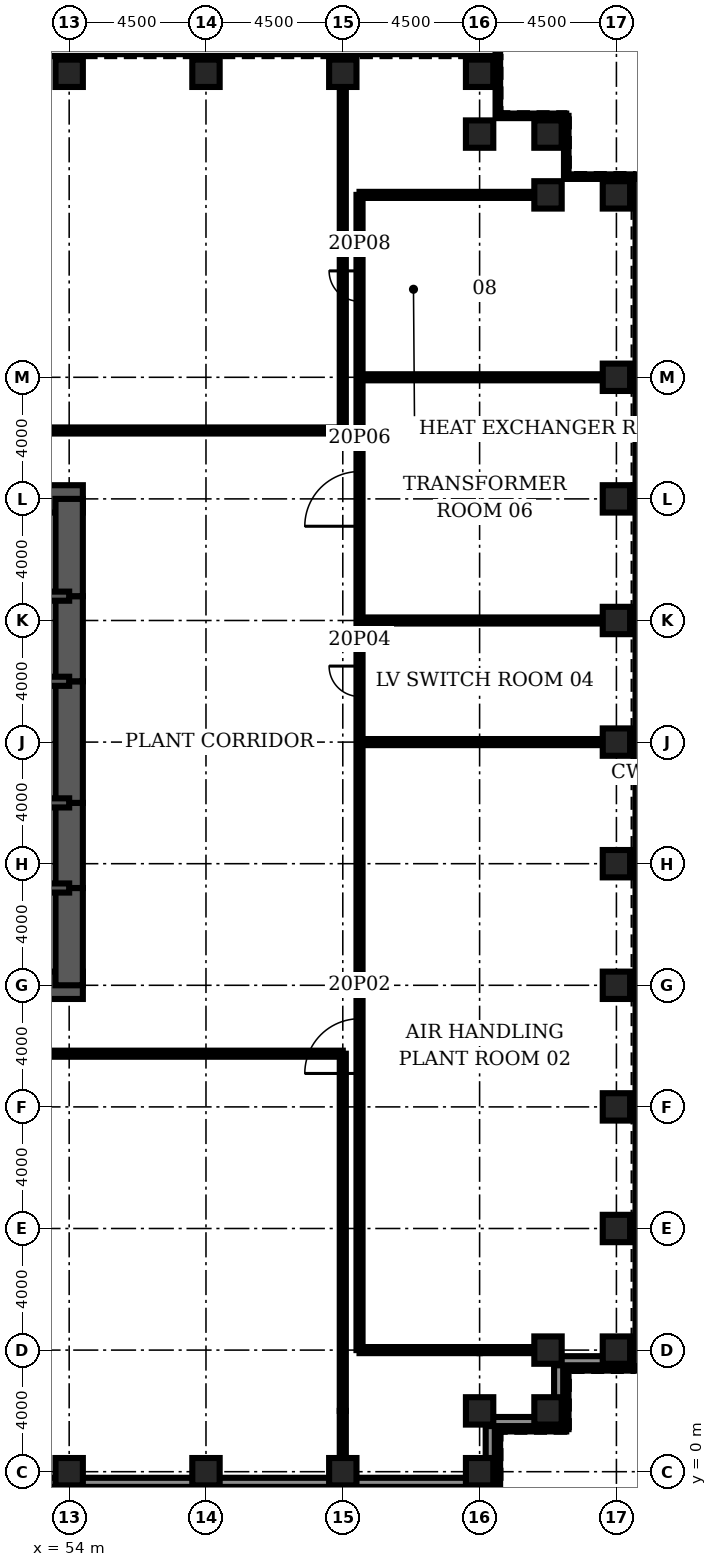
"""IFC4 building model, lengths in metres.
Left out: names, types, materials, properties, quantities, classifications, styles, units other than length and angle.
Written with IfcOpenShell. Run it as: python <this file> out.ifc"""

import sys

from ifc_helpers import new_model, si_unit, direction, frame, frame_2d, origin, origin_2d, place, context, subcontext, project, spatial, rectangle, hollow_rectangle, extrude, element, fill, save


model = new_model("IFC4")
c1 = context("Model", 3, precision=1e-05, world=origin(), true_north=direction((0.0, 1.0)))
c2 = subcontext(c1, "Body", "Model", "MODEL_VIEW")
j1 = project(units=[si_unit("LENGTHUNIT", "METRE"), si_unit("PLANEANGLEUNIT", "RADIAN")], contexts=[c1])
p1 = place(None, origin())
s1 = spatial("IfcSite", under=j1, at=p1, CompositionType="ELEMENT")
p2 = place(p1, origin())
s2 = spatial("IfcBuilding", under=s1, at=p2, CompositionType="ELEMENT")
p3 = place(p2, frame((0.0, 0.0, 95.0)))
s3 = spatial("IfcBuildingStorey", under=s2, at=p3, CompositionType="ELEMENT", Elevation=95.0)
for number, where, z_axis, x_axis in (
    (1, (54.0, 0.056, 0.155), (0.0, 0.342, 0.94), (0.0, -0.94, 0.342)),
    (2, (58.5, 0.056, 0.155), (0.0, 0.342, 0.94), (0.0, -0.94, 0.342)),
    (3, (63.0, 0.056, 0.155), (0.0, 0.342, 0.94), (0.0, -0.94, 0.342)),
    (4, (67.5, 0.056, 0.155), (0.0, 0.342, 0.94), (0.0, -0.94, 0.342)),
    (5, (67.5, 2.056, 0.155), (0.0, 0.342, 0.94), (0.0, -0.94, 0.342)),
    (6, (69.75, 2.056, 0.155), (0.0, 0.342, 0.94), (-1.0, 0.0, 0.0)),
    (7, (69.75, 4.056, 0.155), (0.0, 0.342, 0.94), (-1.0, 0.0, 0.0)),
    (8, (72.0, 4.056, 0.155), (0.0, 0.342, 0.94), (-1.0, 0.0, 0.0)),
):
    element("IfcColumn", number, at=place(p3, frame(where, z_axis=z_axis, x_axis=x_axis)), inside=s3, PredefinedType="USERDEFINED", context=c2, shape_type="SweptSolid", body=[
        extrude(hollow_rectangle(XDim=0.9, YDim=0.9, WallThickness=0.11, at=origin_2d()), origin(), (0.0, 0.0, 1.0), 5.522),
    ])
for number, where, z_axis, x_axis in (
    (9, (72.0, 8.0, 0.0), (0.0, 0.0, 1.0), (1.0, 0.0, 0.0)),
    (10, (72.0, 12.0, 0.0), (0.0, 0.0, 1.0), (1.0, 0.0, 0.0)),
    (11, (72.0, 16.0, 0.0), (0.0, 0.0, 1.0), (1.0, 0.0, 0.0)),
    (12, (72.0, 20.0, 0.0), (0.0, 0.0, 1.0), (1.0, 0.0, 0.0)),
    (13, (72.0, 24.0, 0.0), (0.0, 0.0, 1.0), (1.0, 0.0, 0.0)),
    (14, (72.0, 28.0, 0.0), (0.0, 0.0, 1.0), (1.0, 0.0, 0.0)),
    (15, (72.0, 32.0, 0.0), (0.0, 0.0, 1.0), (1.0, 0.0, 0.0)),
    (16, (72.0, 36.0, 0.0), (0.0, 0.0, 1.0), (1.0, 0.0, 0.0)),
    (17, (72.0, 42.0, 0.0), (0.0, 0.0, 1.0), (1.0, 0.0, 0.0)),
    (18, (69.75, 42.0, 0.0), (0.0, 0.0, 1.0), (1.0, 0.0, 0.0)),
    (19, (69.75, 44.0, 0.0), (0.0, 0.0, 1.0), (1.0, 0.0, 0.0)),
    (20, (67.5, 44.0, 0.0), (0.0, 0.0, 1.0), (0.0, 1.0, 0.0)),
    (21, (67.5, 46.0, 0.0), (0.0, 0.0, 1.0), (0.0, 1.0, 0.0)),
    (22, (63.0, 46.0, 0.0), (0.0, 0.0, 1.0), (0.0, 1.0, 0.0)),
    (23, (58.5, 46.0, 0.0), (0.0, 0.0, 1.0), (0.0, 1.0, 0.0)),
    (24, (54.0, 46.0, 0.0), (0.0, 0.0, 1.0), (0.0, 1.0, 0.0)),
):
    element("IfcColumn", number, at=place(p3, frame(where, z_axis=z_axis, x_axis=x_axis)), inside=s3, PredefinedType="COLUMN", context=c2, shape_type="SweptSolid", body=[
        extrude(hollow_rectangle(XDim=0.9, YDim=0.9, WallThickness=0.11, at=origin_2d()), origin(), (0.0, 0.0, 1.0), 5.5),
    ])
for number, where, z_axis, x_axis in (
    (25, (45.0, 16.0, 0.0), (0.0, 0.0, 1.0), (1.0, 0.0, 0.0)),
    (26, (54.45, 32.0, 0.0), (0.0, 0.0, 1.0), (-1.0, 0.0, 0.0)),
):
    element("IfcWall", number, at=place(p3, frame(where, z_axis=z_axis, x_axis=x_axis)), inside=s3, PredefinedType="SHEAR", context=c2, shape_type="SweptSolid", body=[
        extrude(rectangle(XDim=9.45, YDim=0.9, at=frame_2d((4.725, 0.0))), origin(), (0.0, 0.0, 1.0), 5.5),
    ])
p4 = place(p3, frame((54.0, 16.0, 0.0), z_axis=(0.0, 0.0, 1.0), x_axis=(0.0, 1.0, 0.0)))
e27 = element("IfcWall", 27, at=p4, inside=s3, PredefinedType="SHEAR", context=c2, shape_type="SweptSolid", body=[
    extrude(rectangle(XDim=3.2, YDim=0.9, at=frame_2d((1.6, 0.0))), origin(), (0.0, 0.0, 1.0), 5.5),
])
p5 = place(p3, frame((54.0, 19.2, 0.0), z_axis=(0.0, 0.0, 1.0), x_axis=(0.0, 1.0, 0.0)))
e28 = element("IfcWall", 28, at=p5, inside=s3, PredefinedType="SHEAR", context=c2, shape_type="SweptSolid", body=[
    extrude(rectangle(XDim=2.8, YDim=0.9, at=frame_2d((1.4, 0.0))), origin(), (0.0, 0.0, 1.0), 5.5),
])
p6 = place(p5, frame((0.4, 0.0, 0.0)))
e29 = element("IfcOpeningElement", 29, at=p6, cuts=e28, PredefinedType="OPENING", context=c2, shape_type="SweptSolid", body=[
    extrude(rectangle(XDim=1.8, YDim=2.1, at=frame_2d((0.9, 1.05))), frame((0.0, 0.46, 0.0), z_axis=(0.0, -1.0, 0.0), x_axis=(1.0, 0.0, 0.0)), (0.0, 0.0, 1.0), 0.92),
])
p7 = place(p3, frame((54.0, 22.0, 0.0), z_axis=(0.0, 0.0, 1.0), x_axis=(0.0, 1.0, 0.0)))
e30 = element("IfcWall", 30, at=p7, inside=s3, PredefinedType="SHEAR", context=c2, shape_type="SweptSolid", body=[
    extrude(rectangle(XDim=4.0, YDim=0.9, at=frame_2d((2.0, 0.0))), origin(), (0.0, 0.0, 1.0), 5.5),
])
p8 = place(p3, frame((54.0, 26.0, 0.0), z_axis=(0.0, 0.0, 1.0), x_axis=(0.0, 1.0, 0.0)))
e31 = element("IfcWall", 31, at=p8, inside=s3, PredefinedType="SHEAR", context=c2, shape_type="SweptSolid", body=[
    extrude(rectangle(XDim=2.8, YDim=0.9, at=frame_2d((1.4, 0.0))), origin(), (0.0, 0.0, 1.0), 5.5),
])
p9 = place(p8, frame((0.6, 0.0, 0.0)))
e32 = element("IfcOpeningElement", 32, at=p9, cuts=e31, PredefinedType="OPENING", context=c2, shape_type="SweptSolid", body=[
    extrude(rectangle(XDim=1.8, YDim=2.1, at=frame_2d((0.9, 1.05))), frame((0.0, 0.46, 0.0), z_axis=(0.0, -1.0, 0.0), x_axis=(1.0, 0.0, 0.0)), (0.0, 0.0, 1.0), 0.92),
])
p10 = place(p3, frame((54.0, 28.8, 0.0), z_axis=(0.0, 0.0, 1.0), x_axis=(0.0, 1.0, 0.0)))
e33 = element("IfcWall", 33, at=p10, inside=s3, PredefinedType="SHEAR", context=c2, shape_type="SweptSolid", body=[
    extrude(rectangle(XDim=3.2, YDim=0.9, at=frame_2d((1.6, 0.0))), origin(), (0.0, 0.0, 1.0), 5.5),
])
p11 = place(p3, frame((45.0, 19.2, 0.0), z_axis=(0.0, 0.0, 1.0), x_axis=(1.0, 0.0, 0.0)))
e34 = element("IfcWall", 34, at=p11, inside=s3, PredefinedType="SOLIDWALL", context=c2, shape_type="SweptSolid", body=[
    extrude(rectangle(XDim=9.0, YDim=0.3, at=frame_2d((4.5, 0.0))), origin(), (0.0, 0.0, 1.0), 5.5),
])
p12 = place(p11, frame((7.35, 0.0, 0.0)))
e35 = element("IfcOpeningElement", 35, at=p12, cuts=e34, PredefinedType="OPENING", context=c2, shape_type="SweptSolid", body=[
    extrude(rectangle(XDim=1.0, YDim=2.1, at=frame_2d((0.5, 1.05))), frame((0.0, 0.16, 0.0), z_axis=(0.0, -1.0, 0.0), x_axis=(1.0, 0.0, 0.0)), (0.0, 0.0, 1.0), 0.32),
])
p13 = place(p3, frame((45.0, 28.8, 0.0), z_axis=(0.0, 0.0, 1.0), x_axis=(1.0, 0.0, 0.0)))
e36 = element("IfcWall", 36, at=p13, inside=s3, PredefinedType="SOLIDWALL", context=c2, shape_type="SweptSolid", body=[
    extrude(rectangle(XDim=9.0, YDim=0.3, at=frame_2d((4.5, 0.0))), origin(), (0.0, 0.0, 1.0), 5.5),
])
p14 = place(p13, frame((7.35, 0.0, 0.0)))
e37 = element("IfcOpeningElement", 37, at=p14, cuts=e36, PredefinedType="OPENING", context=c2, shape_type="SweptSolid", body=[
    extrude(rectangle(XDim=1.0, YDim=2.1, at=frame_2d((0.5, 1.05))), frame((0.0, 0.16, 0.0), z_axis=(0.0, -1.0, 0.0), x_axis=(1.0, 0.0, 0.0)), (0.0, 0.0, 1.0), 0.32),
])
p15 = place(p3, frame((48.0, 22.0, 0.0), z_axis=(0.0, 0.0, 1.0), x_axis=(1.0, 0.0, 0.0)))
e38 = element("IfcWall", 38, at=p15, inside=s3, PredefinedType="SOLIDWALL", context=c2, shape_type="SweptSolid", body=[
    extrude(rectangle(XDim=6.0, YDim=0.3, at=frame_2d((3.0, 0.0))), origin(), (0.0, 0.0, 1.0), 5.5),
])
p16 = place(p15, frame((2.0, 0.0, 0.0)))
e39 = element("IfcOpeningElement", 39, at=p16, cuts=e38, PredefinedType="OPENING", context=c2, shape_type="SweptSolid", body=[
    extrude(rectangle(XDim=1.0, YDim=2.1, at=frame_2d((0.5, 1.05))), frame((0.0, 0.16, 0.0), z_axis=(0.0, -1.0, 0.0), x_axis=(1.0, 0.0, 0.0)), (0.0, 0.0, 1.0), 0.32),
])
p17 = place(p15, frame((4.3, 0.0, 0.0)))
e40 = element("IfcOpeningElement", 40, at=p17, cuts=e38, PredefinedType="OPENING", context=c2, shape_type="SweptSolid", body=[
    extrude(rectangle(XDim=1.0, YDim=2.1, at=frame_2d((0.5, 1.05))), frame((0.0, 0.16, 0.0), z_axis=(0.0, -1.0, 0.0), x_axis=(1.0, 0.0, 0.0)), (0.0, 0.0, 1.0), 0.32),
])
p18 = place(p3, frame((48.0, 26.0, 0.0), z_axis=(0.0, 0.0, 1.0), x_axis=(1.0, 0.0, 0.0)))
e41 = element("IfcWall", 41, at=p18, inside=s3, PredefinedType="SOLIDWALL", context=c2, shape_type="SweptSolid", body=[
    extrude(rectangle(XDim=6.0, YDim=0.3, at=frame_2d((3.0, 0.0))), origin(), (0.0, 0.0, 1.0), 5.5),
])
p19 = place(p3, frame((63.55, 4.0, 0.0), z_axis=(0.0, 0.0, 1.0), x_axis=(1.0, 0.0, 0.0)))
e42 = element("IfcWall", 42, at=p19, inside=s3, PredefinedType="PARTITIONING", context=c2, shape_type="SweptSolid", body=[
    extrude(rectangle(XDim=3.95, YDim=0.2, at=frame_2d((1.975, 0.0))), origin(), (0.0, 0.0, 1.0), 5.34),
])
p20 = place(p3, frame((67.5, 4.0, 0.0), z_axis=(0.0, 0.0, 1.0), x_axis=(1.0, 0.0, 0.0)))
e43 = element("IfcWall", 43, at=p20, inside=s3, PredefinedType="PARTITIONING", context=c2, shape_type="SweptSolid", body=[
    extrude(rectangle(XDim=1.8, YDim=0.2, at=frame_2d((0.9, 0.0))), origin(), (0.0, 0.0, 1.0), 4.64),
])
p21 = place(p3, frame((9.0, 13.75, 0.0), z_axis=(0.0, 0.0, 1.0), x_axis=(1.0, 0.0, 0.0)))
e44 = element("IfcWall", 44, at=p21, inside=s3, PredefinedType="PARTITIONING", context=c2, shape_type="SweptSolid", body=[
    extrude(rectangle(XDim=54.0, YDim=0.2, at=frame_2d((27.0, 0.0))), origin(), (0.0, 0.0, 1.0), 5.34),
])
p22 = place(p21, frame((26.1, 0.0, 0.0)))
e45 = element("IfcOpeningElement", 45, at=p22, cuts=e44, PredefinedType="OPENING", context=c2, shape_type="SweptSolid", body=[
    extrude(rectangle(XDim=1.8, YDim=2.1, at=frame_2d((0.9, 1.05))), frame((0.0, 0.11, 0.0), z_axis=(0.0, -1.0, 0.0), x_axis=(1.0, 0.0, 0.0)), (0.0, 0.0, 1.0), 0.22),
])
for number, where, z_axis, x_axis in (
    (46, (63.55, 24.0, 0.0), (0.0, 0.0, 1.0), (1.0, 0.0, 0.0)),
    (47, (63.55, 28.0, 0.0), (0.0, 0.0, 1.0), (1.0, 0.0, 0.0)),
):
    element("IfcWall", number, at=place(p3, frame(where, z_axis=z_axis, x_axis=x_axis)), inside=s3, PredefinedType="PARTITIONING", context=c2, shape_type="SweptSolid", body=[
        extrude(rectangle(XDim=8.0, YDim=0.2, at=frame_2d((4.0, 0.0))), origin(), (0.0, 0.0, 1.0), 5.34),
    ])
p23 = place(p3, frame((9.0, 34.25, 0.0), z_axis=(0.0, 0.0, 1.0), x_axis=(1.0, 0.0, 0.0)))
e48 = element("IfcWall", 48, at=p23, inside=s3, PredefinedType="PARTITIONING", context=c2, shape_type="SweptSolid", body=[
    extrude(rectangle(XDim=54.0, YDim=0.2, at=frame_2d((27.0, 0.0))), origin(), (0.0, 0.0, 1.0), 5.34),
])
p24 = place(p23, frame((26.1, 0.0, 0.0)))
e49 = element("IfcOpeningElement", 49, at=p24, cuts=e48, PredefinedType="OPENING", context=c2, shape_type="SweptSolid", body=[
    extrude(rectangle(XDim=1.8, YDim=2.1, at=frame_2d((0.9, 1.05))), frame((0.0, 0.11, 0.0), z_axis=(0.0, -1.0, 0.0), x_axis=(1.0, 0.0, 0.0)), (0.0, 0.0, 1.0), 0.22),
])
p25 = place(p3, frame((63.55, 36.0, 0.0), z_axis=(0.0, 0.0, 1.0), x_axis=(1.0, 0.0, 0.0)))
e50 = element("IfcWall", 50, at=p25, inside=s3, PredefinedType="PARTITIONING", context=c2, shape_type="SweptSolid", body=[
    extrude(rectangle(XDim=8.0, YDim=0.2, at=frame_2d((4.0, 0.0))), origin(), (0.0, 0.0, 1.0), 5.34),
])
p26 = place(p3, frame((63.55, 42.0, 0.0), z_axis=(0.0, 0.0, 1.0), x_axis=(1.0, 0.0, 0.0)))
e51 = element("IfcWall", 51, at=p26, inside=s3, PredefinedType="PARTITIONING", context=c2, shape_type="SweptSolid", body=[
    extrude(rectangle(XDim=5.75, YDim=0.2, at=frame_2d((2.875, 0.0))), origin(), (0.0, 0.0, 1.0), 5.34),
])
p27 = place(p3, frame((63.0, 0.45, 0.0), z_axis=(0.0, 0.0, 1.0), x_axis=(0.0, 1.0, 0.0)))
e52 = element("IfcWall", 52, at=p27, inside=s3, PredefinedType="PARTITIONING", context=c2, shape_type="SweptSolid", body=[
    extrude(rectangle(XDim=1.55, YDim=0.2, at=frame_2d((0.775, 0.0))), origin(), (0.0, 0.0, 1.0), 4.726),
])
p28 = place(p3, frame((63.0, 2.0, 0.0), z_axis=(0.0, 0.0, 1.0), x_axis=(0.0, 1.0, 0.0)))
e53 = element("IfcWall", 53, at=p28, inside=s3, PredefinedType="PARTITIONING", context=c2, shape_type="SweptSolid", body=[
    extrude(rectangle(XDim=11.75, YDim=0.2, at=frame_2d((5.875, 0.0))), origin(), (0.0, 0.0, 1.0), 5.25),
])
p29 = place(p3, frame((63.0, 34.25, 0.0), z_axis=(0.0, 0.0, 1.0), x_axis=(0.0, 1.0, 0.0)))
e54 = element("IfcWall", 54, at=p29, inside=s3, PredefinedType="PARTITIONING", context=c2, shape_type="SweptSolid", body=[
    extrude(rectangle(XDim=11.3, YDim=0.2, at=frame_2d((5.65, 0.0))), origin(), (0.0, 0.0, 1.0), 5.34),
])
p30 = place(p3, frame((63.55, 4.0, 0.0), z_axis=(0.0, 0.0, 1.0), x_axis=(0.0, 1.0, 0.0)))
e55 = element("IfcWall", 55, at=p30, inside=s3, PredefinedType="PARTITIONING", context=c2, shape_type="SweptSolid", body=[
    extrude(rectangle(XDim=38.0, YDim=0.2, at=frame_2d((19.0, 0.0))), origin(), (0.0, 0.0, 1.0), 5.34),
])
p31 = place(p30, frame((9.1, 0.0, 0.0)))
e56 = element("IfcOpeningElement", 56, at=p31, cuts=e55, PredefinedType="OPENING", context=c2, shape_type="SweptSolid", body=[
    extrude(rectangle(XDim=1.8, YDim=2.1, at=frame_2d((0.9, 1.05))), frame((0.0, 0.11, 0.0), z_axis=(0.0, -1.0, 0.0), x_axis=(1.0, 0.0, 0.0)), (0.0, 0.0, 1.0), 0.22),
])
p32 = place(p30, frame((21.5, 0.0, 0.0)))
e57 = element("IfcOpeningElement", 57, at=p32, cuts=e55, PredefinedType="OPENING", context=c2, shape_type="SweptSolid", body=[
    extrude(rectangle(XDim=1.0, YDim=2.1, at=frame_2d((0.5, 1.05))), frame((0.0, 0.11, 0.0), z_axis=(0.0, -1.0, 0.0), x_axis=(1.0, 0.0, 0.0)), (0.0, 0.0, 1.0), 0.22),
])
p33 = place(p30, frame((27.1, 0.0, 0.0)))
e58 = element("IfcOpeningElement", 58, at=p33, cuts=e55, PredefinedType="OPENING", context=c2, shape_type="SweptSolid", body=[
    extrude(rectangle(XDim=1.8, YDim=2.1, at=frame_2d((0.9, 1.05))), frame((0.0, 0.11, 0.0), z_axis=(0.0, -1.0, 0.0), x_axis=(1.0, 0.0, 0.0)), (0.0, 0.0, 1.0), 0.22),
])
p34 = place(p30, frame((34.5, 0.0, 0.0)))
e59 = element("IfcOpeningElement", 59, at=p34, cuts=e55, PredefinedType="OPENING", context=c2, shape_type="SweptSolid", body=[
    extrude(rectangle(XDim=1.0, YDim=2.1, at=frame_2d((0.5, 1.05))), frame((0.0, 0.11, 0.0), z_axis=(0.0, -1.0, 0.0), x_axis=(1.0, 0.0, 0.0)), (0.0, 0.0, 1.0), 0.22),
])
p35 = place(p3, frame((68.1, -0.6, 0.0), z_axis=(0.0, 0.0, 1.0), x_axis=(0.0, 1.0, 0.0)))
e60 = element("IfcWall", 60, at=p35, inside=s3, PredefinedType="ELEMENTEDWALL", context=c2, shape_type="SweptSolid", body=[
    extrude(rectangle(XDim=2.0, YDim=0.15, at=frame_2d((1.0, 0.0))), origin(), (0.0, 0.0, 1.0), 5.34),
])
p36 = place(p3, frame((68.1, 1.4, 0.0), z_axis=(0.0, 0.0, 1.0), x_axis=(1.0, 0.0, 0.0)))
e61 = element("IfcWall", 61, at=p36, inside=s3, PredefinedType="ELEMENTEDWALL", context=c2, shape_type="SweptSolid", body=[
    extrude(rectangle(XDim=2.25, YDim=0.15, at=frame_2d((1.125, 0.0))), origin(), (0.0, 0.0, 1.0), 5.34),
])
p37 = place(p3, frame((70.35, 1.4, 0.0), z_axis=(0.0, 0.0, 1.0), x_axis=(0.0, 1.0, 0.0)))
e62 = element("IfcWall", 62, at=p37, inside=s3, PredefinedType="ELEMENTEDWALL", context=c2, shape_type="SweptSolid", body=[
    extrude(rectangle(XDim=2.0, YDim=0.15, at=frame_2d((1.0, 0.0))), origin(), (0.0, 0.0, 1.0), 5.34),
])
for number, where, z_axis, x_axis in (
    (63, (70.35, 3.4, 0.0), (0.0, 0.0, 1.0), (1.0, 0.0, 0.0)),
    (64, (72.6, 42.6, 0.0), (0.0, 0.0, 1.0), (-1.0, 0.0, 0.0)),
):
    element("IfcWall", number, at=place(p3, frame(where, z_axis=z_axis, x_axis=x_axis)), inside=s3, PredefinedType="ELEMENTEDWALL", context=c2, shape_type="SweptSolid", body=[
        extrude(rectangle(XDim=2.25, YDim=0.15, at=frame_2d((1.125, 0.0))), origin(), (0.0, 0.0, 1.0), 5.34),
    ])
p38 = place(p3, frame((70.35, 42.6, 0.0), z_axis=(0.0, 0.0, 1.0), x_axis=(0.0, 1.0, 0.0)))
e65 = element("IfcWall", 65, at=p38, inside=s3, PredefinedType="ELEMENTEDWALL", context=c2, shape_type="SweptSolid", body=[
    extrude(rectangle(XDim=2.0, YDim=0.15, at=frame_2d((1.0, 0.0))), origin(), (0.0, 0.0, 1.0), 5.34),
])
p39 = place(p3, frame((70.35, 44.6, 0.0), z_axis=(0.0, 0.0, 1.0), x_axis=(-1.0, 0.0, 0.0)))
e66 = element("IfcWall", 66, at=p39, inside=s3, PredefinedType="ELEMENTEDWALL", context=c2, shape_type="SweptSolid", body=[
    extrude(rectangle(XDim=2.25, YDim=0.15, at=frame_2d((1.125, 0.0))), origin(), (0.0, 0.0, 1.0), 5.34),
])
p40 = place(p3, frame((68.1, 44.6, 0.0), z_axis=(0.0, 0.0, 1.0), x_axis=(0.0, 1.0, 0.0)))
e67 = element("IfcWall", 67, at=p40, inside=s3, PredefinedType="ELEMENTEDWALL", context=c2, shape_type="SweptSolid", body=[
    extrude(rectangle(XDim=2.0, YDim=0.15, at=frame_2d((1.0, 0.0))), origin(), (0.0, 0.0, 1.0), 5.34),
])
p41 = place(p3, frame((4.15, -0.35, 5.5), z_axis=(0.0, 0.0, 1.0), x_axis=(1.0, 0.0, 0.0)))
e68 = element("IfcWall", 68, at=p41, inside=s3, PredefinedType="PARAPET", context=c2, shape_type="SweptSolid", body=[
    extrude(rectangle(XDim=63.7, YDim=0.3, at=frame_2d((31.85, 0.0))), origin(), (0.0, 0.0, 1.0), 1.1),
])
p42 = place(p3, frame((67.85, -0.35, 5.5), z_axis=(0.0, 0.0, 1.0), x_axis=(0.0, 1.0, 0.0)))
e69 = element("IfcWall", 69, at=p42, inside=s3, PredefinedType="PARAPET", context=c2, shape_type="SweptSolid", body=[
    extrude(rectangle(XDim=2.0, YDim=0.3, at=frame_2d((1.0, 0.0))), origin(), (0.0, 0.0, 1.0), 1.1),
])
p43 = place(p3, frame((67.85, 1.65, 5.5), z_axis=(0.0, 0.0, 1.0), x_axis=(1.0, 0.0, 0.0)))
e70 = element("IfcWall", 70, at=p43, inside=s3, PredefinedType="PARAPET", context=c2, shape_type="SweptSolid", body=[
    extrude(rectangle(XDim=2.25, YDim=0.3, at=frame_2d((1.125, 0.0))), origin(), (0.0, 0.0, 1.0), 1.1),
])
p44 = place(p3, frame((70.1, 1.65, 5.5), z_axis=(0.0, 0.0, 1.0), x_axis=(0.0, 1.0, 0.0)))
e71 = element("IfcWall", 71, at=p44, inside=s3, PredefinedType="PARAPET", context=c2, shape_type="SweptSolid", body=[
    extrude(rectangle(XDim=2.0, YDim=0.3, at=frame_2d((1.0, 0.0))), origin(), (0.0, 0.0, 1.0), 1.1),
])
p45 = place(p3, frame((70.1, 3.65, 5.5), z_axis=(0.0, 0.0, 1.0), x_axis=(1.0, 0.0, 0.0)))
e72 = element("IfcWall", 72, at=p45, inside=s3, PredefinedType="PARAPET", context=c2, shape_type="SweptSolid", body=[
    extrude(rectangle(XDim=2.25, YDim=0.3, at=frame_2d((1.125, 0.0))), origin(), (0.0, 0.0, 1.0), 1.1),
])
p46 = place(p31, origin())
e73 = element("IfcDoor", 73, at=p46, inside=s3, OperationType="SINGLE_SWING_LEFT", PredefinedType="DOOR", context=c2, shape_type="SweptSolid", body=[
    extrude(rectangle(XDim=1.8, YDim=2.1, at=frame_2d((0.9, 1.05))), frame((0.0, 0.025, 0.0), z_axis=(0.0, -1.0, 0.0), x_axis=(1.0, 0.0, 0.0)), (0.0, 0.0, 1.0), 0.05),
])
fill(e56, e73)
p47 = place(p32, origin())
e74 = element("IfcDoor", 74, at=p47, inside=s3, OperationType="SINGLE_SWING_RIGHT", PredefinedType="DOOR", context=c2, shape_type="SweptSolid", body=[
    extrude(rectangle(XDim=1.0, YDim=2.1, at=frame_2d((0.5, 1.05))), frame((0.0, 0.025, 0.0), z_axis=(0.0, -1.0, 0.0), x_axis=(1.0, 0.0, 0.0)), (0.0, 0.0, 1.0), 0.05),
])
fill(e57, e74)
p48 = place(p33, origin())
e75 = element("IfcDoor", 75, at=p48, inside=s3, OperationType="SINGLE_SWING_LEFT", PredefinedType="DOOR", context=c2, shape_type="SweptSolid", body=[
    extrude(rectangle(XDim=1.8, YDim=2.1, at=frame_2d((0.9, 1.05))), frame((0.0, 0.025, 0.0), z_axis=(0.0, -1.0, 0.0), x_axis=(1.0, 0.0, 0.0)), (0.0, 0.0, 1.0), 0.05),
])
fill(e58, e75)
p49 = place(p34, origin())
e76 = element("IfcDoor", 76, at=p49, inside=s3, OperationType="SINGLE_SWING_RIGHT", PredefinedType="DOOR", context=c2, shape_type="SweptSolid", body=[
    extrude(rectangle(XDim=1.0, YDim=2.1, at=frame_2d((0.5, 1.05))), frame((0.0, 0.025, 0.0), z_axis=(0.0, -1.0, 0.0), x_axis=(1.0, 0.0, 0.0)), (0.0, 0.0, 1.0), 0.05),
])
fill(e59, e76)
p50 = place(p6, origin())
e77 = element("IfcDoor", 77, at=p50, inside=s3, OperationType="SINGLE_SWING_LEFT", PredefinedType="DOOR", context=c2, shape_type="SweptSolid", body=[
    extrude(rectangle(XDim=1.8, YDim=2.1, at=frame_2d((0.9, 1.05))), frame((0.0, 0.45, 0.0), z_axis=(0.0, -1.0, 0.0), x_axis=(1.0, 0.0, 0.0)), (0.0, 0.0, 1.0), 0.899),
])
fill(e29, e77)
p51 = place(p9, origin())
e78 = element("IfcDoor", 78, at=p51, inside=s3, OperationType="SINGLE_SWING_LEFT", PredefinedType="DOOR", context=c2, shape_type="SweptSolid", body=[
    extrude(rectangle(XDim=1.8, YDim=2.1, at=frame_2d((0.9, 1.05))), frame((0.0, 0.45, 0.0), z_axis=(0.0, -1.0, 0.0), x_axis=(1.0, 0.0, 0.0)), (0.0, 0.0, 1.0), 0.899),
])
fill(e32, e78)
save(model, sys.argv[1])
